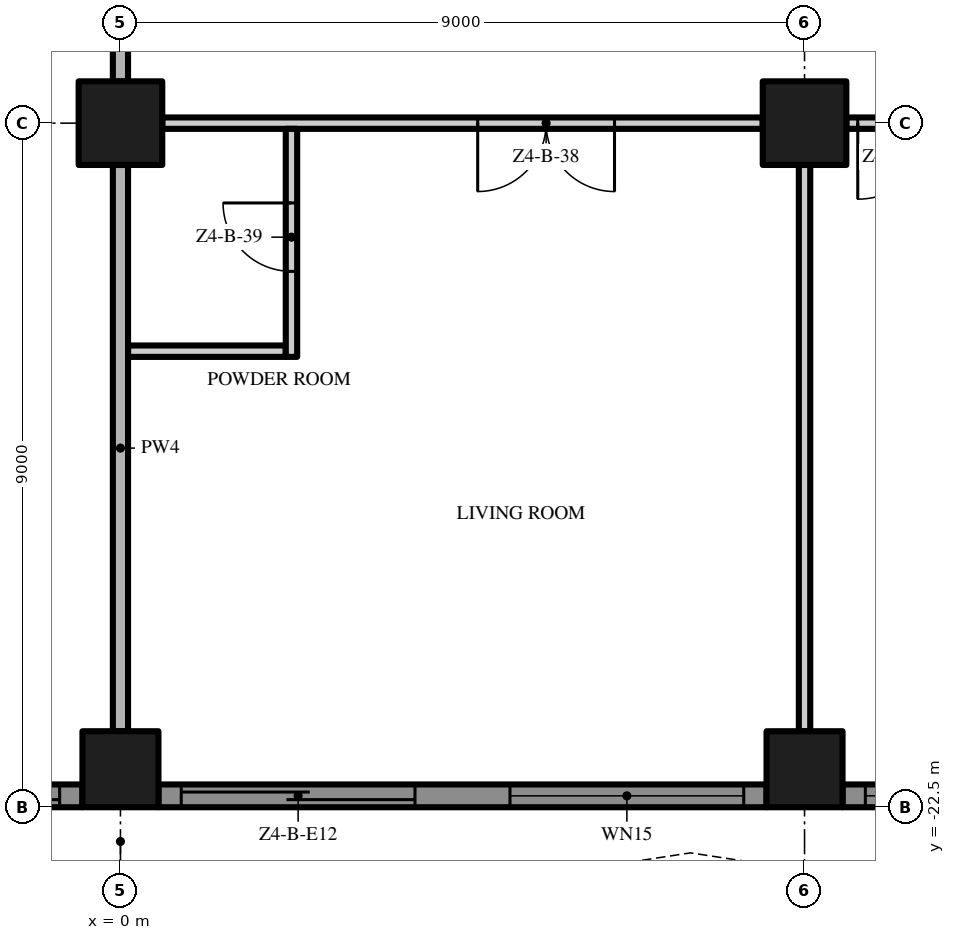
"""IFC4 building model, lengths in metres.
Left out: names, types, materials, properties, quantities, classifications, styles, units other than length and angle.
Written with IfcOpenShell. Run it as: python <this file> out.ifc"""

import sys

from ifc_helpers import new_model, si_unit, direction, frame, frame_2d, origin, origin_2d, place, context, subcontext, project, spatial, polyline, rectangle, outline, extrude, element, fill, save


model = new_model("IFC4")
c1 = context("Model", 3, precision=1e-05, world=origin(), true_north=direction((0.0, 1.0)))
c2 = subcontext(c1, "Body", "Model", "MODEL_VIEW")
j1 = project(units=[si_unit("LENGTHUNIT", "METRE"), si_unit("PLANEANGLEUNIT", "RADIAN")], contexts=[c1])
p1 = place(None, origin())
s1 = spatial("IfcSite", under=j1, at=p1, CompositionType="ELEMENT")
p2 = place(p1, origin())
s2 = spatial("IfcBuilding", under=s1, at=p2, CompositionType="ELEMENT")
p3 = place(p2, frame((0.0, 0.0, 203.4)))
s3 = spatial("IfcBuildingStorey", under=s2, at=p3, CompositionType="ELEMENT", Elevation=203.4)
p4 = place(p3, frame((0.0, -13.5, 0.0), z_axis=(0.0, 0.0, 1.0), x_axis=(1.0, 0.0, 0.0)))
e1 = element("IfcColumn", 1, at=p4, inside=s3, PredefinedType="COLUMN", context=c2, shape_type="SweptSolid", body=[
    extrude(rectangle(XDim=1.1, YDim=1.1, at=origin_2d()), origin(), (0.0, 0.0, 1.0), 3.5),
])
p5 = place(p3, frame((0.0, -22.0, 0.0), z_axis=(0.0, 0.0, 1.0), x_axis=(1.0, 0.0, 0.0)))
e2 = element("IfcColumn", 2, at=p5, inside=s3, PredefinedType="COLUMN", context=c2, shape_type="SweptSolid", body=[
    extrude(rectangle(XDim=1.0, YDim=1.0, at=origin_2d()), origin(), (0.0, 0.0, 1.0), 3.5),
])
p6 = place(p3, frame((9.0, -13.5, 0.0), z_axis=(0.0, 0.0, 1.0), x_axis=(1.0, 0.0, 0.0)))
e3 = element("IfcColumn", 3, at=p6, inside=s3, PredefinedType="COLUMN", context=c2, shape_type="SweptSolid", body=[
    extrude(rectangle(XDim=1.1, YDim=1.1, at=origin_2d()), origin(), (0.0, 0.0, 1.0), 3.5),
])
p7 = place(p3, frame((9.0, -22.0, 0.0), z_axis=(0.0, 0.0, 1.0), x_axis=(1.0, 0.0, 0.0)))
e4 = element("IfcColumn", 4, at=p7, inside=s3, PredefinedType="COLUMN", context=c2, shape_type="SweptSolid", body=[
    extrude(rectangle(XDim=1.0, YDim=1.0, at=origin_2d()), origin(), (0.0, 0.0, 1.0), 3.5),
])
p8 = place(p3, frame((-0.5, -22.35, 0.0), z_axis=(0.0, 0.0, 1.0), x_axis=(-1.0, 0.0, 0.0)))
e5 = element("IfcWall", 5, at=p8, inside=s3, PredefinedType="SOLIDWALL", context=c2, shape_type="SweptSolid", body=[
    extrude(rectangle(XDim=8.0, YDim=0.3, at=frame_2d((4.0, 0.0))), origin(), (0.0, 0.0, 1.0), 3.5),
])
p9 = place(p8, frame((4.625, 0.0, 0.45)))
e6 = element("IfcOpeningElement", 6, at=p9, cuts=e5, PredefinedType="OPENING", context=c2, shape_type="SweptSolid", body=[
    extrude(rectangle(XDim=3.075, YDim=2.65, at=frame_2d((1.538, 1.325))), frame((0.0, 0.16, 0.0), z_axis=(0.0, -1.0, 0.0), x_axis=(1.0, 0.0, 0.0)), (0.0, 0.0, 1.0), 0.32),
])
p10 = place(p8, frame((0.3, 0.0, 0.0)))
e7 = element("IfcOpeningElement", 7, at=p10, cuts=e5, PredefinedType="OPENING", context=c2, shape_type="SweptSolid", body=[
    extrude(rectangle(XDim=3.075, YDim=2.4, at=frame_2d((1.538, 1.2))), frame((0.0, 0.16, 0.0), z_axis=(0.0, -1.0, 0.0), x_axis=(1.0, 0.0, 0.0)), (0.0, 0.0, 1.0), 0.32),
])
p11 = place(p3, frame((8.5, -22.35, 0.0), z_axis=(0.0, 0.0, 1.0), x_axis=(-1.0, 0.0, 0.0)))
e8 = element("IfcWall", 8, at=p11, inside=s3, PredefinedType="SOLIDWALL", context=c2, shape_type="SweptSolid", body=[
    extrude(rectangle(XDim=8.0, YDim=0.3, at=frame_2d((4.0, 0.0))), origin(), (0.0, 0.0, 1.0), 3.5),
])
p12 = place(p11, frame((4.625, 0.0, 0.0)))
e9 = element("IfcOpeningElement", 9, at=p12, cuts=e8, PredefinedType="OPENING", context=c2, shape_type="SweptSolid", body=[
    extrude(rectangle(XDim=3.075, YDim=2.4, at=frame_2d((1.538, 1.2))), frame((0.0, 0.16, 0.0), z_axis=(0.0, -1.0, 0.0), x_axis=(1.0, 0.0, 0.0)), (0.0, 0.0, 1.0), 0.32),
])
p13 = place(p11, frame((0.3, 0.0, 0.45)))
e10 = element("IfcOpeningElement", 10, at=p13, cuts=e8, PredefinedType="OPENING", context=c2, shape_type="SweptSolid", body=[
    extrude(rectangle(XDim=3.075, YDim=2.65, at=frame_2d((1.538, 1.325))), frame((0.0, 0.16, 0.0), z_axis=(0.0, -1.0, 0.0), x_axis=(1.0, 0.0, 0.0)), (0.0, 0.0, 1.0), 0.32),
])
p14 = place(p3, frame((17.5, -22.35, 0.0), z_axis=(0.0, 0.0, 1.0), x_axis=(-1.0, 0.0, 0.0)))
e11 = element("IfcWall", 11, at=p14, inside=s3, PredefinedType="SOLIDWALL", context=c2, shape_type="SweptSolid", body=[
    extrude(rectangle(XDim=8.0, YDim=0.3, at=frame_2d((4.0, 0.0))), origin(), (0.0, 0.0, 1.0), 3.5),
])
p15 = place(p14, frame((4.625, 0.0, 0.45)))
e12 = element("IfcOpeningElement", 12, at=p15, cuts=e11, PredefinedType="OPENING", context=c2, shape_type="SweptSolid", body=[
    extrude(rectangle(XDim=3.075, YDim=2.65, at=frame_2d((1.538, 1.325))), frame((0.0, 0.16, 0.0), z_axis=(0.0, -1.0, 0.0), x_axis=(1.0, 0.0, 0.0)), (0.0, 0.0, 1.0), 0.32),
])
p16 = place(p14, frame((0.3, 0.0, 0.0)))
e13 = element("IfcOpeningElement", 13, at=p16, cuts=e11, PredefinedType="OPENING", context=c2, shape_type="SweptSolid", body=[
    extrude(rectangle(XDim=3.075, YDim=2.4, at=frame_2d((1.538, 1.2))), frame((0.0, 0.16, 0.0), z_axis=(0.0, -1.0, 0.0), x_axis=(1.0, 0.0, 0.0)), (0.0, 0.0, 1.0), 0.32),
])
p17 = place(p3, origin())
e14 = element("IfcWall", 14, at=p17, inside=s3, PredefinedType="USERDEFINED", context=c2, shape_type="SweptSolid", body=[
    extrude(outline(polyline([(-22.5, -23.1), (-21.0, -23.329), (-19.5, -23.929), (-18.0, -24.671), (-16.5, -25.271), (-15.0, -25.5), (-13.5, -25.271), (-12.0, -24.671), (-10.5, -23.929), (-9.0, -23.329), (-7.5, -23.1), (-6.0, -23.329), (-4.5, -23.929), (-3.0, -24.671), (-1.5, -25.271), (0.0, -25.5), (1.5, -25.271), (3.0, -24.671), (4.5, -23.929), (6.0, -23.329), (7.5, -23.1), (9.0, -23.329), (10.5, -23.929), (12.0, -24.671), (13.5, -25.271), (15.0, -25.5), (16.5, -25.271), (18.0, -24.671), (19.5, -23.929), (21.0, -23.329), (22.5, -23.1), (22.462, -22.853), (20.934, -23.086), (19.398, -23.701), (17.898, -24.442), (16.434, -25.028), (15.0, -25.247), (13.566, -25.028), (12.102, -24.442), (10.602, -23.701), (9.066, -23.086), (7.5, -22.847), (5.934, -23.086), (4.398, -23.701), (2.898, -24.442), (1.434, -25.028), (0.0, -25.247), (-1.434, -25.028), (-2.898, -24.442), (-4.398, -23.701), (-5.934, -23.086), (-7.5, -22.847), (-9.066, -23.086), (-10.602, -23.701), (-12.102, -24.442), (-13.566, -25.028), (-15.0, -25.247), (-16.434, -25.028), (-17.898, -24.442), (-19.398, -23.701), (-20.934, -23.086), (-22.462, -22.853), (-22.5, -23.1)])), origin(), (0.0, 0.0, 1.0), 0.9),
])
p18 = place(p3, frame((0.1, -16.5, 0.0), z_axis=(0.0, 0.0, 1.0), x_axis=(1.0, 0.0, 0.0)))
e15 = element("IfcWall", 15, at=p18, inside=s3, PredefinedType="PARTITIONING", context=c2, shape_type="SweptSolid", body=[
    extrude(rectangle(XDim=2.075, YDim=0.15, at=frame_2d((1.038, 0.0))), origin(), (0.0, 0.0, 1.0), 3.5),
])
p19 = place(p3, frame((8.45, -13.5, 0.0), z_axis=(0.0, 0.0, 1.0), x_axis=(-1.0, 0.0, 0.0)))
e16 = element("IfcWall", 16, at=p19, inside=s3, PredefinedType="PARTITIONING", context=c2, shape_type="SweptSolid", body=[
    extrude(rectangle(XDim=7.9, YDim=0.15, at=frame_2d((3.95, 0.0))), origin(), (0.0, 0.0, 1.0), 3.5),
])
p20 = place(p19, frame((1.95, 0.0, 0.0)))
e17 = element("IfcOpeningElement", 17, at=p20, cuts=e16, PredefinedType="OPENING", context=c2, shape_type="SweptSolid", body=[
    extrude(rectangle(XDim=1.8, YDim=2.4, at=frame_2d((0.9, 1.2))), frame((0.0, 0.085, 0.0), z_axis=(0.0, -1.0, 0.0), x_axis=(1.0, 0.0, 0.0)), (0.0, 0.0, 1.0), 0.17),
])
p21 = place(p3, frame((17.45, -13.5, 0.0), z_axis=(0.0, 0.0, 1.0), x_axis=(-1.0, 0.0, 0.0)))
e18 = element("IfcWall", 18, at=p21, inside=s3, PredefinedType="PARTITIONING", context=c2, shape_type="SweptSolid", body=[
    extrude(rectangle(XDim=7.9, YDim=0.15, at=frame_2d((3.95, 0.0))), origin(), (0.0, 0.0, 1.0), 3.5),
])
p22 = place(p21, frame((6.75, 0.0, 0.0)))
e19 = element("IfcOpeningElement", 19, at=p22, cuts=e18, PredefinedType="OPENING", context=c2, shape_type="SweptSolid", body=[
    extrude(rectangle(XDim=1.0, YDim=2.4, at=frame_2d((0.5, 1.2))), frame((0.0, 0.085, 0.0), z_axis=(0.0, -1.0, 0.0), x_axis=(1.0, 0.0, 0.0)), (0.0, 0.0, 1.0), 0.17),
])
p23 = place(p21, frame((0.15, 0.0, 0.0)))
e20 = element("IfcOpeningElement", 20, at=p23, cuts=e18, PredefinedType="OPENING", context=c2, shape_type="SweptSolid", body=[
    extrude(rectangle(XDim=1.0, YDim=2.4, at=frame_2d((0.5, 1.2))), frame((0.0, 0.085, 0.0), z_axis=(0.0, -1.0, 0.0), x_axis=(1.0, 0.0, 0.0)), (0.0, 0.0, 1.0), 0.17),
])
p24 = place(p3, frame((0.0, -21.5, 0.0), z_axis=(0.0, 0.0, 1.0), x_axis=(0.0, 1.0, 0.0)))
e21 = element("IfcWall", 21, at=p24, inside=s3, PredefinedType="PARTITIONING", context=c2, shape_type="SweptSolid", body=[
    extrude(rectangle(XDim=7.45, YDim=0.2, at=frame_2d((3.725, 0.0))), origin(), (0.0, 0.0, 1.0), 3.5),
])
p25 = place(p3, frame((0.0, -12.95, 0.0), z_axis=(0.0, 0.0, 1.0), x_axis=(0.0, 1.0, 0.0)))
e22 = element("IfcWall", 22, at=p25, inside=s3, PredefinedType="PARTITIONING", context=c2, shape_type="SweptSolid", body=[
    extrude(rectangle(XDim=7.9, YDim=0.2, at=frame_2d((3.95, 0.0))), origin(), (0.0, 0.0, 1.0), 3.5),
])
p26 = place(p3, frame((2.25, -16.575, 0.0), z_axis=(0.0, 0.0, 1.0), x_axis=(0.0, 1.0, 0.0)))
e23 = element("IfcWall", 23, at=p26, inside=s3, PredefinedType="PARTITIONING", context=c2, shape_type="SweptSolid", body=[
    extrude(rectangle(XDim=3.0, YDim=0.15, at=frame_2d((1.5, 0.0))), origin(), (0.0, 0.0, 1.0), 3.5),
])
p27 = place(p26, frame((1.125, 0.0, 0.0)))
e24 = element("IfcOpeningElement", 24, at=p27, cuts=e23, PredefinedType="OPENING", context=c2, shape_type="SweptSolid", body=[
    extrude(rectangle(XDim=0.9, YDim=2.1, at=frame_2d((0.45, 1.05))), frame((0.0, 0.085, 0.0), z_axis=(0.0, -1.0, 0.0), x_axis=(1.0, 0.0, 0.0)), (0.0, 0.0, 1.0), 0.17),
])
p28 = place(p3, frame((9.0, -21.5, 0.0), z_axis=(0.0, 0.0, 1.0), x_axis=(0.0, 1.0, 0.0)))
e25 = element("IfcWall", 25, at=p28, inside=s3, PredefinedType="PARTITIONING", context=c2, shape_type="SweptSolid", body=[
    extrude(rectangle(XDim=7.45, YDim=0.15, at=frame_2d((3.725, 0.0))), origin(), (0.0, 0.0, 1.0), 3.5),
])
p29 = place(p10, origin())
e26 = element("IfcDoor", 26, at=p29, inside=s3, OperationType="SINGLE_SWING_LEFT", PredefinedType="DOOR", context=c2, shape_type="SweptSolid", body=[
    extrude(rectangle(XDim=3.075, YDim=2.4, at=frame_2d((1.538, 1.2))), frame((0.0, 0.025, 0.0), z_axis=(0.0, -1.0, 0.0), x_axis=(1.0, 0.0, 0.0)), (0.0, 0.0, 1.0), 0.05),
])
fill(e7, e26)
p30 = place(p12, origin())
e27 = element("IfcDoor", 27, at=p30, inside=s3, OperationType="SINGLE_SWING_LEFT", PredefinedType="DOOR", context=c2, shape_type="SweptSolid", body=[
    extrude(rectangle(XDim=3.075, YDim=2.4, at=frame_2d((1.538, 1.2))), frame((0.0, 0.025, 0.0), z_axis=(0.0, -1.0, 0.0), x_axis=(1.0, 0.0, 0.0)), (0.0, 0.0, 1.0), 0.05),
])
fill(e9, e27)
p31 = place(p13, origin())
e28 = element("IfcWindow", 28, at=p31, inside=s3, PartitioningType="SINGLE_PANEL", PredefinedType="WINDOW", context=c2, shape_type="SweptSolid", body=[
    extrude(rectangle(XDim=3.075, YDim=2.65, at=frame_2d((1.538, 1.325))), frame((0.0, 0.03, 0.0), z_axis=(0.0, -1.0, 0.0), x_axis=(1.0, 0.0, 0.0)), (0.0, 0.0, 1.0), 0.06),
])
fill(e10, e28)
p32 = place(p15, origin())
e29 = element("IfcWindow", 29, at=p32, inside=s3, PartitioningType="SINGLE_PANEL", PredefinedType="WINDOW", context=c2, shape_type="SweptSolid", body=[
    extrude(rectangle(XDim=3.075, YDim=2.65, at=frame_2d((1.538, 1.325))), frame((0.0, 0.03, 0.0), z_axis=(0.0, -1.0, 0.0), x_axis=(1.0, 0.0, 0.0)), (0.0, 0.0, 1.0), 0.06),
])
fill(e12, e29)
p33 = place(p20, origin())
e30 = element("IfcDoor", 30, at=p33, inside=s3, OperationType="DOUBLE_DOOR_SINGLE_SWING", PredefinedType="DOOR", context=c2, shape_type="SweptSolid", body=[
    extrude(rectangle(XDim=1.8, YDim=2.4, at=frame_2d((0.9, 1.2))), frame((0.0, 0.025, 0.0), z_axis=(0.0, -1.0, 0.0), x_axis=(1.0, 0.0, 0.0)), (0.0, 0.0, 1.0), 0.05),
])
fill(e17, e30)
p34 = place(p27, origin())
e31 = element("IfcDoor", 31, at=p34, inside=s3, OperationType="SINGLE_SWING_RIGHT", PredefinedType="DOOR", context=c2, shape_type="SweptSolid", body=[
    extrude(rectangle(XDim=0.9, YDim=2.1, at=frame_2d((0.45, 1.05))), frame((0.0, 0.025, 0.0), z_axis=(0.0, -1.0, 0.0), x_axis=(1.0, 0.0, 0.0)), (0.0, 0.0, 1.0), 0.05),
])
fill(e24, e31)
p35 = place(p22, origin())
e32 = element("IfcDoor", 32, at=p35, inside=s3, OperationType="SINGLE_SWING_RIGHT", PredefinedType="DOOR", context=c2, shape_type="SweptSolid", body=[
    extrude(rectangle(XDim=1.0, YDim=2.4, at=frame_2d((0.5, 1.2))), frame((0.0, 0.025, 0.0), z_axis=(0.0, -1.0, 0.0), x_axis=(1.0, 0.0, 0.0)), (0.0, 0.0, 1.0), 0.05),
])
fill(e19, e32)
save(model, sys.argv[1])
